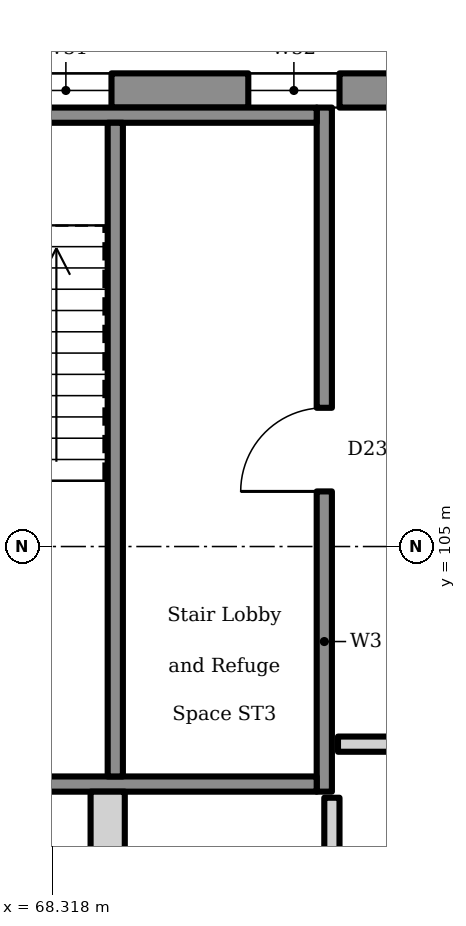
"""IFC4 building model, lengths in metres.
Left out: names, types, materials, properties, quantities, classifications, styles, units other than length and angle.
Written with IfcOpenShell. Run it as: python <this file> out.ifc"""

import sys

from ifc_helpers import new_model, si_unit, direction, frame, frame_2d, origin, place, context, subcontext, project, spatial, rectangle, extrude, element, fill, save


model = new_model("IFC4")
c1 = context("Model", 3, precision=1e-05, world=origin(), true_north=direction((0.0, 1.0)))
c2 = subcontext(c1, "Body", "Model", "MODEL_VIEW")
j1 = project(units=[si_unit("LENGTHUNIT", "METRE"), si_unit("PLANEANGLEUNIT", "RADIAN")], contexts=[c1])
p1 = place(None, origin())
s1 = spatial("IfcSite", under=j1, at=p1, CompositionType="ELEMENT")
p2 = place(p1, origin())
s2 = spatial("IfcBuilding", under=s1, at=p2, CompositionType="ELEMENT")
p3 = place(p2, frame((0.0, 0.0, 5.4)))
s3 = spatial("IfcBuildingStorey", under=s2, at=p3, CompositionType="ELEMENT", Elevation=5.4)
p4 = place(p3, frame((65.825, 111.0, 0.0), z_axis=(0.0, 0.0, 1.0), x_axis=(1.0, 0.0, 0.0)))
e1 = element("IfcWall", 1, at=p4, inside=s3, PredefinedType="SOLIDWALL", context=c2, shape_type="SweptSolid", body=[
    extrude(rectangle(XDim=8.35, YDim=0.45, at=frame_2d((4.175, 0.0))), origin(), (0.0, 0.0, 1.0), 3.8),
])
p5 = place(p4, frame((2.075, 0.0, 0.8)))
e2 = element("IfcOpeningElement", 2, at=p5, cuts=e1, PredefinedType="OPENING", context=c2, shape_type="SweptSolid", body=[
    extrude(rectangle(XDim=1.2, YDim=1.4, at=frame_2d((0.6, 0.7))), frame((0.0, 0.235, 0.0), z_axis=(0.0, -1.0, 0.0), x_axis=(1.0, 0.0, 0.0)), (0.0, 0.0, 1.0), 0.47),
])
p6 = place(p4, frame((5.075, 0.0, 0.8)))
e3 = element("IfcOpeningElement", 3, at=p6, cuts=e1, PredefinedType="OPENING", context=c2, shape_type="SweptSolid", body=[
    extrude(rectangle(XDim=1.2, YDim=1.4, at=frame_2d((0.6, 0.7))), frame((0.0, 0.235, 0.0), z_axis=(0.0, -1.0, 0.0), x_axis=(1.0, 0.0, 0.0)), (0.0, 0.0, 1.0), 0.47),
])
p7 = place(p3, frame((69.05, 99.891, 0.0), z_axis=(0.0, 0.0, 1.0), x_axis=(0.0, 1.0, 0.0)))
e4 = element("IfcWall", 4, at=p7, inside=s3, PredefinedType="SOLIDWALL", context=c2, shape_type="SweptSolid", body=[
    extrude(rectangle(XDim=1.884, YDim=0.45, at=frame_2d((0.942, 0.0))), origin(), (0.0, 0.0, 1.0), 4.3),
])
p8 = place(p3, frame((71.9, 101.775, 0.0), z_axis=(0.0, 0.0, 1.0), x_axis=(0.0, 1.0, 0.0)))
e5 = element("IfcWall", 5, at=p8, inside=s3, PredefinedType="SOLIDWALL", context=c2, shape_type="SweptSolid", body=[
    extrude(rectangle(XDim=9.0, YDim=0.2, at=frame_2d((4.5, 0.0))), origin(), (0.0, 0.0, 1.0), 4.3),
])
p9 = place(p8, frame((3.95, 0.0, 0.0)))
e6 = element("IfcOpeningElement", 6, at=p9, cuts=e5, PredefinedType="OPENING", context=c2, shape_type="SweptSolid", body=[
    extrude(rectangle(XDim=1.1, YDim=2.1, at=frame_2d((0.55, 1.05))), frame((0.0, 0.11, 0.0), z_axis=(0.0, -1.0, 0.0), x_axis=(1.0, 0.0, 0.0)), (0.0, 0.0, 1.0), 0.22),
])
for number, where, z_axis, x_axis in (
    (7, (66.2, 101.875, 0.0), (0.0, 0.0, 1.0), (1.0, 0.0, 0.0)),
    (8, (66.2, 110.675, 0.0), (0.0, 0.0, 1.0), (1.0, 0.0, 0.0)),
):
    element("IfcWall", number, at=place(p3, frame(where, z_axis=z_axis, x_axis=x_axis)), inside=s3, PredefinedType="SOLIDWALL", context=c2, shape_type="SweptSolid", body=[
        extrude(rectangle(XDim=5.6, YDim=0.2, at=frame_2d((2.8, 0.0))), origin(), (0.0, 0.0, 1.0), 4.3),
    ])
p10 = place(p3, frame((69.15, 101.975, 0.0), z_axis=(0.0, 0.0, 1.0), x_axis=(0.0, 1.0, 0.0)))
e9 = element("IfcWall", 9, at=p10, inside=s3, PredefinedType="SOLIDWALL", context=c2, shape_type="SweptSolid", body=[
    extrude(rectangle(XDim=8.6, YDim=0.2, at=frame_2d((4.3, 0.0))), origin(), (0.0, 0.0, 1.0), 4.3),
])
p11 = place(p3, frame((73.014, 102.4, 0.0), z_axis=(0.0, 0.0, 1.0), x_axis=(-1.0, 0.0, 0.0)))
e10 = element("IfcWall", 10, at=p11, inside=s3, PredefinedType="SOLIDWALL", context=c2, shape_type="SweptSolid", body=[
    extrude(rectangle(XDim=0.934, YDim=0.2, at=frame_2d((0.467, 0.0))), origin(), (0.0, 0.0, 1.0), 2.3),
])
p12 = place(p3, frame((72.0, 98.7, 0.0), z_axis=(0.0, 0.0, 1.0), x_axis=(0.0, 1.0, 0.0)))
e11 = element("IfcWall", 11, at=p12, inside=s3, PredefinedType="SOLIDWALL", context=c2, shape_type="SweptSolid", body=[
    extrude(rectangle(XDim=2.995, YDim=0.2, at=frame_2d((1.498, 0.0))), origin(), (0.0, 0.0, 1.0), 2.3),
])
p13 = place(p12, frame((0.998, 0.0, 0.0)))
e12 = element("IfcOpeningElement", 12, at=p13, cuts=e11, PredefinedType="OPENING", context=c2, shape_type="SweptSolid", body=[
    extrude(rectangle(XDim=1.0, YDim=2.1, at=frame_2d((0.5, 1.05))), frame((0.0, 0.11, 0.0), z_axis=(0.0, -1.0, 0.0), x_axis=(1.0, 0.0, 0.0)), (0.0, 0.0, 1.0), 0.22),
])
p14 = place(p5, origin())
e13 = element("IfcWindow", 13, at=p14, inside=s3, PartitioningType="SINGLE_PANEL", PredefinedType="WINDOW", context=c2, shape_type="SweptSolid", body=[
    extrude(rectangle(XDim=1.2, YDim=1.4, at=frame_2d((0.6, 0.7))), frame((0.0, 0.03, 0.0), z_axis=(0.0, -1.0, 0.0), x_axis=(1.0, 0.0, 0.0)), (0.0, 0.0, 1.0), 0.06),
])
fill(e2, e13)
p15 = place(p6, origin())
e14 = element("IfcWindow", 14, at=p15, inside=s3, PartitioningType="SINGLE_PANEL", PredefinedType="WINDOW", context=c2, shape_type="SweptSolid", body=[
    extrude(rectangle(XDim=1.2, YDim=1.4, at=frame_2d((0.6, 0.7))), frame((0.0, 0.03, 0.0), z_axis=(0.0, -1.0, 0.0), x_axis=(1.0, 0.0, 0.0)), (0.0, 0.0, 1.0), 0.06),
])
fill(e3, e14)
p16 = place(p9, origin())
e15 = element("IfcDoor", 15, at=p16, inside=s3, OperationType="SINGLE_SWING_RIGHT", PredefinedType="DOOR", context=c2, shape_type="SweptSolid", body=[
    extrude(rectangle(XDim=1.1, YDim=2.1, at=frame_2d((0.55, 1.05))), frame((0.0, 0.025, 0.0), z_axis=(0.0, -1.0, 0.0), x_axis=(1.0, 0.0, 0.0)), (0.0, 0.0, 1.0), 0.05),
])
fill(e6, e15)
save(model, sys.argv[1])
